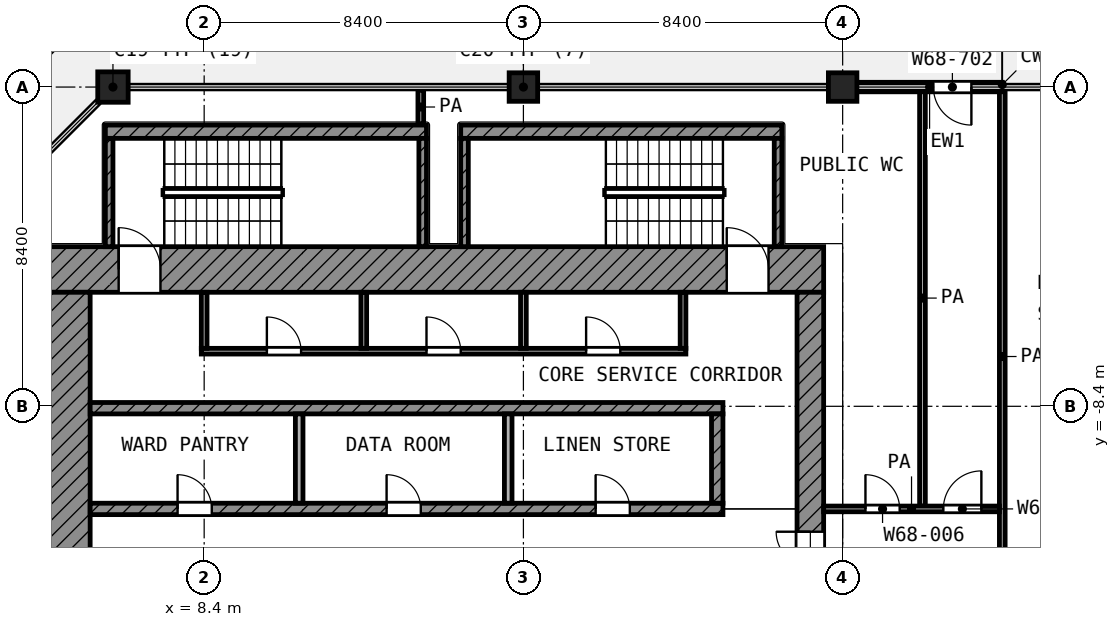
"""IFC4 building model, lengths in metres.
Left out: names, types, materials, properties, quantities, classifications, styles, units other than length and angle.
Written with IfcOpenShell. Run it as: python <this file> out.ifc"""

import sys

from ifc_helpers import new_model, si_unit, direction, frame, frame_2d, origin, origin_2d, place, context, subcontext, project, spatial, rectangle, extrude, element, fill, save


model = new_model("IFC4")
c1 = context("Model", 3, precision=1e-05, world=origin(), true_north=direction((0.0, 1.0)))
c2 = subcontext(c1, "Body", "Model", "MODEL_VIEW")
j1 = project(units=[si_unit("LENGTHUNIT", "METRE"), si_unit("PLANEANGLEUNIT", "RADIAN")], contexts=[c1])
p1 = place(None, origin())
s1 = spatial("IfcSite", under=j1, at=p1, CompositionType="ELEMENT")
p2 = place(p1, origin())
s2 = spatial("IfcBuilding", under=s1, at=p2, CompositionType="ELEMENT")
p3 = place(p2, frame((0.0, 0.0, 294.4)))
s3 = spatial("IfcBuildingStorey", under=s2, at=p3, CompositionType="ELEMENT", Elevation=294.4)
p4 = place(p3, frame((6.0, 0.0, 0.0), z_axis=(0.0, 0.0, 1.0), x_axis=(1.0, 0.0, 0.0)))
e1 = element("IfcColumn", 1, at=p4, inside=s3, PredefinedType="COLUMN", context=c2, shape_type="SweptSolid", body=[
    extrude(rectangle(XDim=0.8, YDim=0.8, at=origin_2d()), origin(), (0.0, 0.0, 1.0), 4.2),
])
for number, where, z_axis, x_axis in (
    (2, (16.8, 0.0, 0.0), (0.0, 0.0, 1.0), (1.0, 0.0, 0.0)),
    (3, (25.2, 0.0, 0.0), (0.0, 0.0, 1.0), (1.0, 0.0, 0.0)),
):
    element("IfcColumn", number, at=place(p3, frame(where, z_axis=z_axis, x_axis=x_axis)), inside=s3, PredefinedType="COLUMN", context=c2, shape_type="SweptSolid", body=[
        extrude(rectangle(XDim=0.75, YDim=0.75, at=origin_2d()), origin(), (0.0, 0.0, 1.0), 4.2),
    ])
p5 = place(p3, frame((29.4, 0.0, 0.0), z_axis=(0.0, 0.0, 1.0), x_axis=(-1.0, 0.0, 0.0)))
e4 = element("IfcWall", 4, at=p5, inside=s3, PredefinedType="SOLIDWALL", context=c2, shape_type="SweptSolid", body=[
    extrude(rectangle(XDim=3.825, YDim=0.25, at=frame_2d((1.913, 0.0))), origin(), (0.0, 0.0, 1.0), 3.48),
])
p6 = place(p5, frame((0.812, 0.0, 0.0)))
e5 = element("IfcOpeningElement", 5, at=p6, cuts=e4, PredefinedType="OPENING", context=c2, shape_type="SweptSolid", body=[
    extrude(rectangle(XDim=1.0, YDim=2.1, at=frame_2d((0.5, 1.05))), frame((0.0, 0.135, 0.0), z_axis=(0.0, -1.0, 0.0), x_axis=(1.0, 0.0, 0.0)), (0.0, 0.0, 1.0), 0.27),
])
p7 = place(p3, frame((4.2, -4.8, 0.0), z_axis=(0.0, 0.0, 1.0), x_axis=(1.0, 0.0, 0.0)))
e6 = element("IfcWall", 6, at=p7, inside=s3, PredefinedType="SHEAR", context=c2, shape_type="SweptSolid", body=[
    extrude(rectangle(XDim=20.5, YDim=1.2, at=frame_2d((10.25, 0.0))), origin(), (0.0, 0.0, 1.0), 3.6),
])
p8 = place(p7, frame((1.95, 0.0, 0.0)))
e7 = element("IfcOpeningElement", 7, at=p8, cuts=e6, PredefinedType="OPENING", context=c2, shape_type="SweptSolid", body=[
    extrude(rectangle(XDim=1.1, YDim=2.1, at=frame_2d((0.55, 1.05))), frame((0.0, 0.61, 0.0), z_axis=(0.0, -1.0, 0.0), x_axis=(1.0, 0.0, 0.0)), (0.0, 0.0, 1.0), 1.22),
])
p9 = place(p7, frame((17.95, 0.0, 0.0)))
e8 = element("IfcOpeningElement", 8, at=p9, cuts=e6, PredefinedType="OPENING", context=c2, shape_type="SweptSolid", body=[
    extrude(rectangle(XDim=1.1, YDim=2.1, at=frame_2d((0.55, 1.05))), frame((0.0, 0.61, 0.0), z_axis=(0.0, -1.0, 0.0), x_axis=(1.0, 0.0, 0.0)), (0.0, 0.0, 1.0), 1.22),
])
p10 = place(p3, frame((4.8, -24.7, 0.0), z_axis=(0.0, 0.0, 1.0), x_axis=(0.0, 1.0, 0.0)))
e9 = element("IfcWall", 9, at=p10, inside=s3, PredefinedType="SHEAR", context=c2, shape_type="SweptSolid", body=[
    extrude(rectangle(XDim=19.3, YDim=1.2, at=frame_2d((9.65, 0.0))), origin(), (0.0, 0.0, 1.0), 3.6),
])
p11 = place(p10, frame((11.15, 0.0, 0.0)))
e10 = element("IfcOpeningElement", 10, at=p11, cuts=e9, PredefinedType="OPENING", context=c2, shape_type="SweptSolid", body=[
    extrude(rectangle(XDim=1.1, YDim=2.1, at=frame_2d((0.55, 1.05))), frame((0.0, 0.61, 0.0), z_axis=(0.0, -1.0, 0.0), x_axis=(1.0, 0.0, 0.0)), (0.0, 0.0, 1.0), 1.22),
])
p12 = place(p10, frame((1.85, 0.0, 0.0)))
e11 = element("IfcOpeningElement", 11, at=p12, cuts=e9, PredefinedType="OPENING", context=c2, shape_type="SweptSolid", body=[
    extrude(rectangle(XDim=1.1, YDim=2.1, at=frame_2d((0.55, 1.05))), frame((0.0, 0.61, 0.0), z_axis=(0.0, -1.0, 0.0), x_axis=(1.0, 0.0, 0.0)), (0.0, 0.0, 1.0), 1.22),
])
p13 = place(p3, frame((24.35, -24.0, 0.0), z_axis=(0.0, 0.0, 1.0), x_axis=(0.0, 1.0, 0.0)))
e12 = element("IfcWall", 12, at=p13, inside=s3, PredefinedType="SHEAR", context=c2, shape_type="SweptSolid", body=[
    extrude(rectangle(XDim=18.6, YDim=0.7, at=frame_2d((9.3, 0.0))), origin(), (0.0, 0.0, 1.0), 3.6),
])
p14 = place(p13, frame((10.5, 0.0, 0.0)))
e13 = element("IfcOpeningElement", 13, at=p14, cuts=e12, PredefinedType="OPENING", context=c2, shape_type="SweptSolid", body=[
    extrude(rectangle(XDim=1.8, YDim=2.1, at=frame_2d((0.9, 1.05))), frame((0.0, 0.36, 0.0), z_axis=(0.0, -1.0, 0.0), x_axis=(1.0, 0.0, 0.0)), (0.0, 0.0, 1.0), 0.72),
])
p15 = place(p3, frame((5.4, -8.45, 0.0), z_axis=(0.0, 0.0, 1.0), x_axis=(1.0, 0.0, 0.0)))
e14 = element("IfcWall", 14, at=p15, inside=s3, PredefinedType="SHEAR", context=c2, shape_type="SweptSolid", body=[
    extrude(rectangle(XDim=16.65, YDim=0.3, at=frame_2d((8.325, 0.0))), origin(), (0.0, 0.0, 1.0), 3.6),
])
p16 = place(p3, frame((5.4, -11.1, 0.0), z_axis=(0.0, 0.0, 1.0), x_axis=(1.0, 0.0, 0.0)))
e15 = element("IfcWall", 15, at=p16, inside=s3, PredefinedType="SHEAR", context=c2, shape_type="SweptSolid", body=[
    extrude(rectangle(XDim=16.65, YDim=0.3, at=frame_2d((8.325, 0.0))), origin(), (0.0, 0.0, 1.0), 3.6),
])
p17 = place(p16, frame((2.3, 0.0, 0.0)))
e16 = element("IfcOpeningElement", 16, at=p17, cuts=e15, PredefinedType="OPENING", context=c2, shape_type="SweptSolid", body=[
    extrude(rectangle(XDim=0.9, YDim=2.1, at=frame_2d((0.45, 1.05))), frame((0.0, 0.16, 0.0), z_axis=(0.0, -1.0, 0.0), x_axis=(1.0, 0.0, 0.0)), (0.0, 0.0, 1.0), 0.32),
])
p18 = place(p16, frame((7.8, 0.0, 0.0)))
e17 = element("IfcOpeningElement", 17, at=p18, cuts=e15, PredefinedType="OPENING", context=c2, shape_type="SweptSolid", body=[
    extrude(rectangle(XDim=0.9, YDim=2.1, at=frame_2d((0.45, 1.05))), frame((0.0, 0.16, 0.0), z_axis=(0.0, -1.0, 0.0), x_axis=(1.0, 0.0, 0.0)), (0.0, 0.0, 1.0), 0.32),
])
p19 = place(p16, frame((13.3, 0.0, 0.0)))
e18 = element("IfcOpeningElement", 18, at=p19, cuts=e15, PredefinedType="OPENING", context=c2, shape_type="SweptSolid", body=[
    extrude(rectangle(XDim=0.9, YDim=2.1, at=frame_2d((0.45, 1.05))), frame((0.0, 0.16, 0.0), z_axis=(0.0, -1.0, 0.0), x_axis=(1.0, 0.0, 0.0)), (0.0, 0.0, 1.0), 0.32),
])
p20 = place(p3, frame((21.9, -10.95, 0.0), z_axis=(0.0, 0.0, 1.0), x_axis=(0.0, 1.0, 0.0)))
e19 = element("IfcWall", 19, at=p20, inside=s3, PredefinedType="SHEAR", context=c2, shape_type="SweptSolid", body=[
    extrude(rectangle(XDim=2.35, YDim=0.3, at=frame_2d((1.175, 0.0))), origin(), (0.0, 0.0, 1.0), 3.6),
])
for number, where, z_axis, x_axis in (
    (20, (10.9, -10.95, 0.0), (0.0, 0.0, 1.0), (0.0, 1.0, 0.0)),
    (21, (16.4, -10.95, 0.0), (0.0, 0.0, 1.0), (0.0, 1.0, 0.0)),
):
    element("IfcWall", number, at=place(p3, frame(where, z_axis=z_axis, x_axis=x_axis)), inside=s3, PredefinedType="PARTITIONING", context=c2, shape_type="SweptSolid", body=[
        extrude(rectangle(XDim=2.35, YDim=0.2, at=frame_2d((1.175, 0.0))), origin(), (0.0, 0.0, 1.0), 3.6),
    ])
p21 = place(p3, frame((8.325, -6.95, 0.0), z_axis=(0.0, 0.0, 1.0), x_axis=(1.0, 0.0, 0.0)))
e22 = element("IfcWall", 22, at=p21, inside=s3, PredefinedType="PARTITIONING", context=c2, shape_type="SweptSolid", body=[
    extrude(rectangle(XDim=12.75, YDim=0.15, at=frame_2d((6.375, 0.0))), origin(), (0.0, 0.0, 1.0), 3.6),
])
p22 = place(p21, frame((1.725, 0.0, 0.0)))
e23 = element("IfcOpeningElement", 23, at=p22, cuts=e22, PredefinedType="OPENING", context=c2, shape_type="SweptSolid", body=[
    extrude(rectangle(XDim=0.9, YDim=2.1, at=frame_2d((0.45, 1.05))), frame((0.0, 0.085, 0.0), z_axis=(0.0, -1.0, 0.0), x_axis=(1.0, 0.0, 0.0)), (0.0, 0.0, 1.0), 0.17),
])
p23 = place(p21, frame((5.925, 0.0, 0.0)))
e24 = element("IfcOpeningElement", 24, at=p23, cuts=e22, PredefinedType="OPENING", context=c2, shape_type="SweptSolid", body=[
    extrude(rectangle(XDim=0.9, YDim=2.1, at=frame_2d((0.45, 1.05))), frame((0.0, 0.085, 0.0), z_axis=(0.0, -1.0, 0.0), x_axis=(1.0, 0.0, 0.0)), (0.0, 0.0, 1.0), 0.17),
])
p24 = place(p21, frame((10.125, 0.0, 0.0)))
e25 = element("IfcOpeningElement", 25, at=p24, cuts=e22, PredefinedType="OPENING", context=c2, shape_type="SweptSolid", body=[
    extrude(rectangle(XDim=0.9, YDim=2.1, at=frame_2d((0.45, 1.05))), frame((0.0, 0.085, 0.0), z_axis=(0.0, -1.0, 0.0), x_axis=(1.0, 0.0, 0.0)), (0.0, 0.0, 1.0), 0.17),
])
for number, where, z_axis, x_axis in (
    (26, (8.4, -6.875, 0.0), (0.0, 0.0, 1.0), (0.0, 1.0, 0.0)),
    (27, (12.6, -6.875, 0.0), (0.0, 0.0, 1.0), (0.0, 1.0, 0.0)),
    (28, (16.8, -6.875, 0.0), (0.0, 0.0, 1.0), (0.0, 1.0, 0.0)),
    (29, (21.0, -6.875, 0.0), (0.0, 0.0, 1.0), (0.0, 1.0, 0.0)),
):
    element("IfcWall", number, at=place(p3, frame(where, z_axis=z_axis, x_axis=x_axis)), inside=s3, PredefinedType="PARTITIONING", context=c2, shape_type="SweptSolid", body=[
        extrude(rectangle(XDim=1.475, YDim=0.15, at=frame_2d((0.738, 0.0))), origin(), (0.0, 0.0, 1.0), 3.6),
    ])
p25 = place(p3, frame((5.8, -1.175, 0.0), z_axis=(0.0, 0.0, 1.0), x_axis=(1.0, 0.0, 0.0)))
e30 = element("IfcWall", 30, at=p25, inside=s3, PredefinedType="SHEAR", context=c2, shape_type="SweptSolid", body=[
    extrude(rectangle(XDim=8.45, YDim=0.35, at=frame_2d((4.225, 0.0))), origin(), (0.0, 0.0, 1.0), 3.6),
])
for number, where, z_axis, x_axis in (
    (31, (5.9, -4.2, 0.0), (0.0, 0.0, 1.0), (0.0, 1.0, 0.0)),
    (32, (14.15, -4.2, 0.0), (0.0, 0.0, 1.0), (0.0, 1.0, 0.0)),
):
    element("IfcWall", number, at=place(p3, frame(where, z_axis=z_axis, x_axis=x_axis)), inside=s3, PredefinedType="SHEAR", context=c2, shape_type="SweptSolid", body=[
        extrude(rectangle(XDim=2.85, YDim=0.2, at=frame_2d((1.425, 0.0))), origin(), (0.0, 0.0, 1.0), 3.6),
    ])
p26 = place(p3, frame((15.15, -1.175, 0.0), z_axis=(0.0, 0.0, 1.0), x_axis=(1.0, 0.0, 0.0)))
e33 = element("IfcWall", 33, at=p26, inside=s3, PredefinedType="SHEAR", context=c2, shape_type="SweptSolid", body=[
    extrude(rectangle(XDim=8.45, YDim=0.35, at=frame_2d((4.225, 0.0))), origin(), (0.0, 0.0, 1.0), 3.6),
])
for number, where, z_axis, x_axis in (
    (34, (15.25, -4.2, 0.0), (0.0, 0.0, 1.0), (0.0, 1.0, 0.0)),
    (35, (23.5, -4.2, 0.0), (0.0, 0.0, 1.0), (0.0, 1.0, 0.0)),
):
    element("IfcWall", number, at=place(p3, frame(where, z_axis=z_axis, x_axis=x_axis)), inside=s3, PredefinedType="SHEAR", context=c2, shape_type="SweptSolid", body=[
        extrude(rectangle(XDim=2.85, YDim=0.2, at=frame_2d((1.425, 0.0))), origin(), (0.0, 0.0, 1.0), 3.6),
    ])
p27 = place(p3, frame((24.7, -11.1, 0.0), z_axis=(0.0, 0.0, 1.0), x_axis=(1.0, 0.0, 0.0)))
e36 = element("IfcWall", 36, at=p27, inside=s3, PredefinedType="PARTITIONING", context=c2, shape_type="SweptSolid", body=[
    extrude(rectangle(XDim=4.625, YDim=0.15, at=frame_2d((2.312, 0.0))), origin(), (0.0, 0.0, 1.0), 3.6),
])
p28 = place(p27, frame((1.1, 0.0, 0.0)))
e37 = element("IfcOpeningElement", 37, at=p28, cuts=e36, PredefinedType="OPENING", context=c2, shape_type="SweptSolid", body=[
    extrude(rectangle(XDim=0.9, YDim=2.1, at=frame_2d((0.45, 1.05))), frame((0.0, 0.085, 0.0), z_axis=(0.0, -1.0, 0.0), x_axis=(1.0, 0.0, 0.0)), (0.0, 0.0, 1.0), 0.17),
])
p29 = place(p27, frame((3.15, 0.0, 0.0)))
e38 = element("IfcOpeningElement", 38, at=p29, cuts=e36, PredefinedType="OPENING", context=c2, shape_type="SweptSolid", body=[
    extrude(rectangle(XDim=1.0, YDim=2.1, at=frame_2d((0.5, 1.05))), frame((0.0, 0.085, 0.0), z_axis=(0.0, -1.0, 0.0), x_axis=(1.0, 0.0, 0.0)), (0.0, 0.0, 1.0), 0.17),
])
p30 = place(p3, frame((14.1, -0.97, 0.0), z_axis=(0.0, 0.0, 1.0), x_axis=(0.0, 1.0, 0.0)))
e39 = element("IfcWall", 39, at=p30, inside=s3, PredefinedType="PARTITIONING", context=c2, shape_type="SweptSolid", body=[
    extrude(rectangle(XDim=0.89, YDim=0.15, at=frame_2d((0.445, 0.0))), origin(), (0.0, 0.0, 1.0), 3.6),
])
p31 = place(p3, frame((27.3, -11.025, 0.0), z_axis=(0.0, 0.0, 1.0), x_axis=(0.0, 1.0, 0.0)))
e40 = element("IfcWall", 40, at=p31, inside=s3, PredefinedType="PARTITIONING", context=c2, shape_type="SweptSolid", body=[
    extrude(rectangle(XDim=10.945, YDim=0.15, at=frame_2d((5.472, 0.0))), origin(), (0.0, 0.0, 1.0), 3.6),
])
p32 = place(p3, frame((29.4, -14.1, 0.0), z_axis=(0.0, 0.0, 1.0), x_axis=(0.0, 1.0, 0.0)))
e41 = element("IfcWall", 41, at=p32, inside=s3, PredefinedType="PARTITIONING", context=c2, shape_type="SweptSolid", body=[
    extrude(rectangle(XDim=14.02, YDim=0.15, at=frame_2d((7.01, 0.0))), origin(), (0.0, 0.0, 1.0), 3.6),
])
p33 = place(p6, origin())
e42 = element("IfcDoor", 42, at=p33, inside=s3, OperationType="SINGLE_SWING_LEFT", PredefinedType="DOOR", context=c2, shape_type="SweptSolid", body=[
    extrude(rectangle(XDim=1.0, YDim=2.1, at=frame_2d((0.5, 1.05))), frame((0.0, 0.025, 0.0), z_axis=(0.0, -1.0, 0.0), x_axis=(1.0, 0.0, 0.0)), (0.0, 0.0, 1.0), 0.05),
])
fill(e5, e42)
p34 = place(p8, origin())
e43 = element("IfcDoor", 43, at=p34, inside=s3, OperationType="SINGLE_SWING_LEFT", PredefinedType="DOOR", context=c2, shape_type="SweptSolid", body=[
    extrude(rectangle(XDim=1.1, YDim=2.1, at=frame_2d((0.55, 1.05))), frame((0.0, 0.025, 0.0), z_axis=(0.0, -1.0, 0.0), x_axis=(1.0, 0.0, 0.0)), (0.0, 0.0, 1.0), 0.05),
])
fill(e7, e43)
p35 = place(p9, origin())
e44 = element("IfcDoor", 44, at=p35, inside=s3, OperationType="SINGLE_SWING_LEFT", PredefinedType="DOOR", context=c2, shape_type="SweptSolid", body=[
    extrude(rectangle(XDim=1.1, YDim=2.1, at=frame_2d((0.55, 1.05))), frame((0.0, 0.025, 0.0), z_axis=(0.0, -1.0, 0.0), x_axis=(1.0, 0.0, 0.0)), (0.0, 0.0, 1.0), 0.05),
])
fill(e8, e44)
p36 = place(p14, origin())
e45 = element("IfcDoor", 45, at=p36, inside=s3, OperationType="DOUBLE_DOOR_SINGLE_SWING", PredefinedType="DOOR", context=c2, shape_type="SweptSolid", body=[
    extrude(rectangle(XDim=1.8, YDim=2.1, at=frame_2d((0.9, 1.05))), frame((0.0, 0.025, 0.0), z_axis=(0.0, -1.0, 0.0), x_axis=(1.0, 0.0, 0.0)), (0.0, 0.0, 1.0), 0.05),
])
fill(e13, e45)
p37 = place(p22, origin())
e46 = element("IfcDoor", 46, at=p37, inside=s3, OperationType="SINGLE_SWING_LEFT", PredefinedType="DOOR", context=c2, shape_type="SweptSolid", body=[
    extrude(rectangle(XDim=0.9, YDim=2.1, at=frame_2d((0.45, 1.05))), frame((0.0, 0.025, 0.0), z_axis=(0.0, -1.0, 0.0), x_axis=(1.0, 0.0, 0.0)), (0.0, 0.0, 1.0), 0.05),
])
fill(e23, e46)
p38 = place(p23, origin())
e47 = element("IfcDoor", 47, at=p38, inside=s3, OperationType="SINGLE_SWING_LEFT", PredefinedType="DOOR", context=c2, shape_type="SweptSolid", body=[
    extrude(rectangle(XDim=0.9, YDim=2.1, at=frame_2d((0.45, 1.05))), frame((0.0, 0.025, 0.0), z_axis=(0.0, -1.0, 0.0), x_axis=(1.0, 0.0, 0.0)), (0.0, 0.0, 1.0), 0.05),
])
fill(e24, e47)
p39 = place(p24, origin())
e48 = element("IfcDoor", 48, at=p39, inside=s3, OperationType="SINGLE_SWING_LEFT", PredefinedType="DOOR", context=c2, shape_type="SweptSolid", body=[
    extrude(rectangle(XDim=0.9, YDim=2.1, at=frame_2d((0.45, 1.05))), frame((0.0, 0.025, 0.0), z_axis=(0.0, -1.0, 0.0), x_axis=(1.0, 0.0, 0.0)), (0.0, 0.0, 1.0), 0.05),
])
fill(e25, e48)
p40 = place(p17, origin())
e49 = element("IfcDoor", 49, at=p40, inside=s3, OperationType="SINGLE_SWING_LEFT", PredefinedType="DOOR", context=c2, shape_type="SweptSolid", body=[
    extrude(rectangle(XDim=0.9, YDim=2.1, at=frame_2d((0.45, 1.05))), frame((0.0, 0.025, 0.0), z_axis=(0.0, -1.0, 0.0), x_axis=(1.0, 0.0, 0.0)), (0.0, 0.0, 1.0), 0.05),
])
fill(e16, e49)
p41 = place(p18, origin())
e50 = element("IfcDoor", 50, at=p41, inside=s3, OperationType="SINGLE_SWING_LEFT", PredefinedType="DOOR", context=c2, shape_type="SweptSolid", body=[
    extrude(rectangle(XDim=0.9, YDim=2.1, at=frame_2d((0.45, 1.05))), frame((0.0, 0.025, 0.0), z_axis=(0.0, -1.0, 0.0), x_axis=(1.0, 0.0, 0.0)), (0.0, 0.0, 1.0), 0.05),
])
fill(e17, e50)
p42 = place(p19, origin())
e51 = element("IfcDoor", 51, at=p42, inside=s3, OperationType="SINGLE_SWING_LEFT", PredefinedType="DOOR", context=c2, shape_type="SweptSolid", body=[
    extrude(rectangle(XDim=0.9, YDim=2.1, at=frame_2d((0.45, 1.05))), frame((0.0, 0.025, 0.0), z_axis=(0.0, -1.0, 0.0), x_axis=(1.0, 0.0, 0.0)), (0.0, 0.0, 1.0), 0.05),
])
fill(e18, e51)
p43 = place(p28, origin())
e52 = element("IfcDoor", 52, at=p43, inside=s3, OperationType="SINGLE_SWING_LEFT", PredefinedType="DOOR", context=c2, shape_type="SweptSolid", body=[
    extrude(rectangle(XDim=0.9, YDim=2.1, at=frame_2d((0.45, 1.05))), frame((0.0, 0.025, 0.0), z_axis=(0.0, -1.0, 0.0), x_axis=(1.0, 0.0, 0.0)), (0.0, 0.0, 1.0), 0.05),
])
fill(e37, e52)
p44 = place(p29, origin())
e53 = element("IfcDoor", 53, at=p44, inside=s3, OperationType="SINGLE_SWING_RIGHT", PredefinedType="DOOR", context=c2, shape_type="SweptSolid", body=[
    extrude(rectangle(XDim=1.0, YDim=2.1, at=frame_2d((0.5, 1.05))), frame((0.0, 0.025, 0.0), z_axis=(0.0, -1.0, 0.0), x_axis=(1.0, 0.0, 0.0)), (0.0, 0.0, 1.0), 0.05),
])
fill(e38, e53)
save(model, sys.argv[1])
